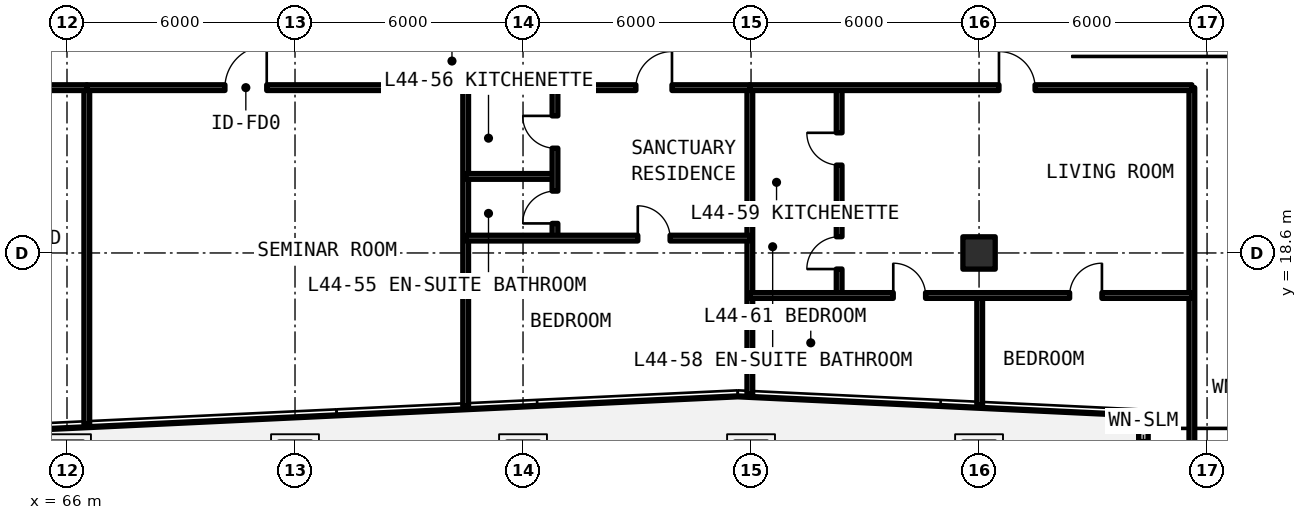
"""IFC4 building model, lengths in metres.
Left out: names, types, materials, properties, quantities, classifications, styles, units other than length and angle.
Written with IfcOpenShell. Run it as: python <this file> out.ifc"""

import sys

from ifc_helpers import new_model, si_unit, direction, frame, frame_2d, origin, origin_2d, place, context, subcontext, project, spatial, rectangle, extrude, element, fill, save


model = new_model("IFC4")
c1 = context("Model", 3, precision=1e-05, world=origin(), true_north=direction((0.0, 1.0)))
c2 = subcontext(c1, "Body", "Model", "MODEL_VIEW")
j1 = project(units=[si_unit("LENGTHUNIT", "METRE"), si_unit("PLANEANGLEUNIT", "RADIAN")], contexts=[c1])
p1 = place(None, origin())
s1 = spatial("IfcSite", under=j1, at=p1, CompositionType="ELEMENT")
p2 = place(p1, origin())
s2 = spatial("IfcBuilding", under=s1, at=p2, CompositionType="ELEMENT")
p3 = place(p2, frame((0.0, 0.0, 158.4)))
s3 = spatial("IfcBuildingStorey", under=s2, at=p3, CompositionType="ELEMENT", Elevation=158.4)
p4 = place(p3, frame((90.0, 18.6, 0.0), z_axis=(0.0, 0.0, 1.0), x_axis=(1.0, 0.0, 0.0)))
e1 = element("IfcColumn", 1, at=p4, inside=s3, PredefinedType="COLUMN", context=c2, shape_type="SweptSolid", body=[
    extrude(rectangle(XDim=0.85, YDim=0.85, at=origin_2d()), origin(), (0.0, 0.0, 1.0), 3.63),
])
p5 = place(p3, frame((94.325, 14.399, 0.0), z_axis=(0.0, 0.0, 1.0), x_axis=(0.0, -1.0, 0.0)))
e2 = element("IfcWall", 2, at=p5, inside=s3, PredefinedType="SOLIDWALL", context=c2, shape_type="SweptSolid", body=[
    extrude(rectangle(XDim=2.374, YDim=0.25, at=frame_2d((1.187, 0.0))), origin(), (0.0, 0.0, 1.0), 3.41),
])
p6 = place(p5, frame((0.762, 0.0, 0.78)))
e3 = element("IfcOpeningElement", 3, at=p6, cuts=e2, PredefinedType="OPENING", context=c2, shape_type="SweptSolid", body=[
    extrude(rectangle(XDim=0.85, YDim=1.65, at=frame_2d((0.425, 0.825))), frame((0.0, 0.135, 0.0), z_axis=(0.0, -1.0, 0.0), x_axis=(1.0, 0.0, 0.0)), (0.0, 0.0, 1.0), 0.27),
])
p7 = place(p3, frame((95.748, 12.025, 0.0), z_axis=(0.0, 0.0, 1.0), x_axis=(0.70708586489, 0.707127696864, 0.0)))
e4 = element("IfcWall", 4, at=p7, inside=s3, PredefinedType="SOLIDWALL", context=c2, shape_type="SweptSolid", body=[
    extrude(rectangle(XDim=5.836, YDim=0.25, at=frame_2d((2.918, 0.0))), origin(), (0.0, 0.0, 1.0), 3.41),
])
p8 = place(p7, frame((1.218, 0.0, 0.78)))
e5 = element("IfcOpeningElement", 5, at=p8, cuts=e4, PredefinedType="OPENING", context=c2, shape_type="SweptSolid", body=[
    extrude(rectangle(XDim=3.4, YDim=1.66, at=frame_2d((1.7, 0.83))), frame((0.0, 0.135, 0.0), z_axis=(0.0, -1.0, 0.0), x_axis=(1.0, 0.0, 0.0)), (0.0, 0.0, 1.0), 0.27),
])
p9 = place(p3, frame((95.6, 12.025, 0.0), z_axis=(0.0, 0.0, 1.0), x_axis=(0.0, 1.0, 0.0)))
e6 = element("IfcWall", 6, at=p9, inside=s3, PredefinedType="SOLIDWALL", context=c2, shape_type="SweptSolid", body=[
    extrude(rectangle(XDim=10.925, YDim=0.15, at=frame_2d((5.462, 0.0))), origin(), (0.0, 0.0, 1.0), 2.63),
])
p10 = place(p3, frame((66.521, 14.093, 0.0), z_axis=(0.0, 0.0, 1.0), x_axis=(0.0, 1.0, 0.0)))
e7 = element("IfcWall", 7, at=p10, inside=s3, PredefinedType="SOLIDWALL", context=c2, shape_type="SweptSolid", body=[
    extrude(rectangle(XDim=8.857, YDim=0.15, at=frame_2d((4.428, 0.0))), origin(), (0.0, 0.0, 1.0), 2.63),
])
p11 = place(p3, frame((58.767, 22.95, 0.0), z_axis=(0.0, 0.0, 1.0), x_axis=(1.0, 0.0, 0.0)))
e8 = element("IfcWall", 8, at=p11, inside=s3, PredefinedType="SOLIDWALL", context=c2, shape_type="SweptSolid", body=[
    extrude(rectangle(XDim=7.754, YDim=0.15, at=frame_2d((3.877, 0.0))), origin(), (0.0, 0.0, 1.0), 2.63),
])
p12 = place(p11, frame((4.617, 0.0, 0.0)))
e9 = element("IfcOpeningElement", 9, at=p12, cuts=e8, PredefinedType="OPENING", context=c2, shape_type="SweptSolid", body=[
    extrude(rectangle(XDim=0.95, YDim=2.15, at=frame_2d((0.475, 1.075))), frame((0.0, 0.085, 0.0), z_axis=(0.0, -1.0, 0.0), x_axis=(1.0, 0.0, 0.0)), (0.0, 0.0, 1.0), 0.17),
])
p13 = place(p3, frame((76.491, 14.566, 0.0), z_axis=(0.0, 0.0, 1.0), x_axis=(0.0, 1.0, 0.0)))
e10 = element("IfcWall", 10, at=p13, inside=s3, PredefinedType="SOLIDWALL", context=c2, shape_type="SweptSolid", body=[
    extrude(rectangle(XDim=8.384, YDim=0.15, at=frame_2d((4.192, 0.0))), origin(), (0.0, 0.0, 1.0), 2.63),
])
p14 = place(p3, frame((66.521, 22.95, 0.0), z_axis=(0.0, 0.0, 1.0), x_axis=(1.0, 0.0, 0.0)))
e11 = element("IfcWall", 11, at=p14, inside=s3, PredefinedType="SOLIDWALL", context=c2, shape_type="SweptSolid", body=[
    extrude(rectangle(XDim=9.97, YDim=0.15, at=frame_2d((4.985, 0.0))), origin(), (0.0, 0.0, 1.0), 2.63),
])
p15 = place(p14, frame((3.635, 0.0, 0.0)))
e12 = element("IfcOpeningElement", 12, at=p15, cuts=e11, PredefinedType="OPENING", context=c2, shape_type="SweptSolid", body=[
    extrude(rectangle(XDim=1.1, YDim=2.15, at=frame_2d((0.55, 1.075))), frame((0.0, 0.085, 0.0), z_axis=(0.0, -1.0, 0.0), x_axis=(1.0, 0.0, 0.0)), (0.0, 0.0, 1.0), 0.17),
])
p16 = place(p3, frame((83.969, 14.89, 0.0), z_axis=(0.0, 0.0, 1.0), x_axis=(0.0, 1.0, 0.0)))
e13 = element("IfcWall", 13, at=p16, inside=s3, PredefinedType="SOLIDWALL", context=c2, shape_type="SweptSolid", body=[
    extrude(rectangle(XDim=8.06, YDim=0.15, at=frame_2d((4.03, 0.0))), origin(), (0.0, 0.0, 1.0), 2.63),
])
p17 = place(p3, frame((76.491, 20.614, 0.0), z_axis=(0.0, 0.0, 1.0), x_axis=(1.0, 0.0, 0.0)))
e14 = element("IfcWall", 14, at=p17, inside=s3, PredefinedType="PARTITIONING", context=c2, shape_type="SweptSolid", body=[
    extrude(rectangle(XDim=2.35, YDim=0.15, at=frame_2d((1.175, 0.0))), origin(), (0.0, 0.0, 1.0), 2.63),
])
p18 = place(p3, frame((78.841, 18.991, 0.0), z_axis=(0.0, 0.0, 1.0), x_axis=(0.0, 1.0, 0.0)))
e15 = element("IfcWall", 15, at=p18, inside=s3, PredefinedType="PARTITIONING", context=c2, shape_type="SweptSolid", body=[
    extrude(rectangle(XDim=3.959, YDim=0.15, at=frame_2d((1.979, 0.0))), origin(), (0.0, 0.0, 1.0), 2.63),
])
p19 = place(p18, frame((0.387, 0.0, 0.0)))
e16 = element("IfcOpeningElement", 16, at=p19, cuts=e15, PredefinedType="OPENING", context=c2, shape_type="SweptSolid", body=[
    extrude(rectangle(XDim=0.85, YDim=2.1, at=frame_2d((0.425, 1.05))), frame((0.0, 0.085, 0.0), z_axis=(0.0, -1.0, 0.0), x_axis=(1.0, 0.0, 0.0)), (0.0, 0.0, 1.0), 0.17),
])
p20 = place(p18, frame((2.366, 0.0, 0.0)))
e17 = element("IfcOpeningElement", 17, at=p20, cuts=e15, PredefinedType="OPENING", context=c2, shape_type="SweptSolid", body=[
    extrude(rectangle(XDim=0.85, YDim=2.1, at=frame_2d((0.425, 1.05))), frame((0.0, 0.085, 0.0), z_axis=(0.0, -1.0, 0.0), x_axis=(1.0, 0.0, 0.0)), (0.0, 0.0, 1.0), 0.17),
])
p21 = place(p3, frame((76.491, 18.991, 0.0), z_axis=(0.0, 0.0, 1.0), x_axis=(1.0, 0.0, 0.0)))
e18 = element("IfcWall", 18, at=p21, inside=s3, PredefinedType="PARTITIONING", context=c2, shape_type="SweptSolid", body=[
    extrude(rectangle(XDim=7.478, YDim=0.15, at=frame_2d((3.739, 0.0))), origin(), (0.0, 0.0, 1.0), 2.63),
])
p22 = place(p21, frame((4.529, 0.0, 0.0)))
e19 = element("IfcOpeningElement", 19, at=p22, cuts=e18, PredefinedType="OPENING", context=c2, shape_type="SweptSolid", body=[
    extrude(rectangle(XDim=0.85, YDim=2.1, at=frame_2d((0.425, 1.05))), frame((0.0, 0.085, 0.0), z_axis=(0.0, -1.0, 0.0), x_axis=(1.0, 0.0, 0.0)), (0.0, 0.0, 1.0), 0.17),
])
p23 = place(p3, frame((76.491, 22.95, 0.0), z_axis=(0.0, 0.0, 1.0), x_axis=(1.0, 0.0, 0.0)))
e20 = element("IfcWall", 20, at=p23, inside=s3, PredefinedType="SOLIDWALL", context=c2, shape_type="SweptSolid", body=[
    extrude(rectangle(XDim=7.478, YDim=0.15, at=frame_2d((3.739, 0.0))), origin(), (0.0, 0.0, 1.0), 2.63),
])
p24 = place(p23, frame((4.479, 0.0, 0.0)))
e21 = element("IfcOpeningElement", 21, at=p24, cuts=e20, PredefinedType="OPENING", context=c2, shape_type="SweptSolid", body=[
    extrude(rectangle(XDim=0.95, YDim=2.15, at=frame_2d((0.475, 1.075))), frame((0.0, 0.085, 0.0), z_axis=(0.0, -1.0, 0.0), x_axis=(1.0, 0.0, 0.0)), (0.0, 0.0, 1.0), 0.17),
])
p25 = place(p3, frame((83.969, 19.723, 0.0), z_axis=(0.0, 0.0, 1.0), x_axis=(1.0, 0.0, 0.0)))
e22 = element("IfcWall", 22, at=p25, inside=s3, PredefinedType="PARTITIONING", context=c2, shape_type="SweptSolid", body=[
    extrude(rectangle(XDim=2.35, YDim=0.15, at=frame_2d((1.175, 0.0))), origin(), (0.0, 0.0, 1.0), 2.63),
])
p26 = place(p3, frame((86.318, 17.481, 0.0), z_axis=(0.0, 0.0, 1.0), x_axis=(0.0, 1.0, 0.0)))
e23 = element("IfcWall", 23, at=p26, inside=s3, PredefinedType="PARTITIONING", context=c2, shape_type="SweptSolid", body=[
    extrude(rectangle(XDim=5.469, YDim=0.15, at=frame_2d((2.734, 0.0))), origin(), (0.0, 0.0, 1.0), 2.63),
])
p27 = place(p26, frame((0.696, 0.0, 0.0)))
e24 = element("IfcOpeningElement", 24, at=p27, cuts=e23, PredefinedType="OPENING", context=c2, shape_type="SweptSolid", body=[
    extrude(rectangle(XDim=0.85, YDim=2.1, at=frame_2d((0.425, 1.05))), frame((0.0, 0.085, 0.0), z_axis=(0.0, -1.0, 0.0), x_axis=(1.0, 0.0, 0.0)), (0.0, 0.0, 1.0), 0.17),
])
p28 = place(p26, frame((3.431, 0.0, 0.0)))
e25 = element("IfcOpeningElement", 25, at=p28, cuts=e23, PredefinedType="OPENING", context=c2, shape_type="SweptSolid", body=[
    extrude(rectangle(XDim=0.85, YDim=2.1, at=frame_2d((0.425, 1.05))), frame((0.0, 0.085, 0.0), z_axis=(0.0, -1.0, 0.0), x_axis=(1.0, 0.0, 0.0)), (0.0, 0.0, 1.0), 0.17),
])
p29 = place(p3, frame((90.017, 14.604, 0.0), z_axis=(0.0, 0.0, 1.0), x_axis=(0.0, 1.0, 0.0)))
e26 = element("IfcWall", 26, at=p29, inside=s3, PredefinedType="PARTITIONING", context=c2, shape_type="SweptSolid", body=[
    extrude(rectangle(XDim=2.877, YDim=0.15, at=frame_2d((1.439, 0.0))), origin(), (0.0, 0.0, 1.0), 2.63),
])
p30 = place(p3, frame((83.969, 17.481, 0.0), z_axis=(0.0, 0.0, 1.0), x_axis=(1.0, 0.0, 0.0)))
e27 = element("IfcWall", 27, at=p30, inside=s3, PredefinedType="PARTITIONING", context=c2, shape_type="SweptSolid", body=[
    extrude(rectangle(XDim=11.632, YDim=0.15, at=frame_2d((5.816, 0.0))), origin(), (0.0, 0.0, 1.0), 2.63),
])
p31 = place(p30, frame((3.774, 0.0, 0.0)))
e28 = element("IfcOpeningElement", 28, at=p31, cuts=e27, PredefinedType="OPENING", context=c2, shape_type="SweptSolid", body=[
    extrude(rectangle(XDim=0.85, YDim=2.1, at=frame_2d((0.425, 1.05))), frame((0.0, 0.085, 0.0), z_axis=(0.0, -1.0, 0.0), x_axis=(1.0, 0.0, 0.0)), (0.0, 0.0, 1.0), 0.17),
])
p32 = place(p30, frame((8.415, 0.0, 0.0)))
e29 = element("IfcOpeningElement", 29, at=p32, cuts=e27, PredefinedType="OPENING", context=c2, shape_type="SweptSolid", body=[
    extrude(rectangle(XDim=0.85, YDim=2.1, at=frame_2d((0.425, 1.05))), frame((0.0, 0.085, 0.0), z_axis=(0.0, -1.0, 0.0), x_axis=(1.0, 0.0, 0.0)), (0.0, 0.0, 1.0), 0.17),
])
p33 = place(p3, frame((83.969, 22.95, 0.0), z_axis=(0.0, 0.0, 1.0), x_axis=(1.0, 0.0, 0.0)))
e30 = element("IfcWall", 30, at=p33, inside=s3, PredefinedType="SOLIDWALL", context=c2, shape_type="SweptSolid", body=[
    extrude(rectangle(XDim=11.632, YDim=0.15, at=frame_2d((5.816, 0.0))), origin(), (0.0, 0.0, 1.0), 2.63),
])
p34 = place(p33, frame((6.556, 0.0, 0.0)))
e31 = element("IfcOpeningElement", 31, at=p34, cuts=e30, PredefinedType="OPENING", context=c2, shape_type="SweptSolid", body=[
    extrude(rectangle(XDim=0.95, YDim=2.15, at=frame_2d((0.475, 1.075))), frame((0.0, 0.085, 0.0), z_axis=(0.0, -1.0, 0.0), x_axis=(1.0, 0.0, 0.0)), (0.0, 0.0, 1.0), 0.17),
])
p35 = place(p15, origin())
e32 = element("IfcDoor", 32, at=p35, inside=s3, OperationType="SINGLE_SWING_RIGHT", PredefinedType="DOOR", context=c2, shape_type="SweptSolid", body=[
    extrude(rectangle(XDim=1.1, YDim=2.15, at=frame_2d((0.55, 1.075))), frame((0.0, 0.025, 0.0), z_axis=(0.0, -1.0, 0.0), x_axis=(1.0, 0.0, 0.0)), (0.0, 0.0, 1.0), 0.05),
])
fill(e12, e32)
p36 = place(p19, origin())
e33 = element("IfcDoor", 33, at=p36, inside=s3, OperationType="SINGLE_SWING_LEFT", PredefinedType="DOOR", context=c2, shape_type="SweptSolid", body=[
    extrude(rectangle(XDim=0.85, YDim=2.1, at=frame_2d((0.425, 1.05))), frame((0.0, 0.025, 0.0), z_axis=(0.0, -1.0, 0.0), x_axis=(1.0, 0.0, 0.0)), (0.0, 0.0, 1.0), 0.05),
])
fill(e16, e33)
p37 = place(p20, origin())
e34 = element("IfcDoor", 34, at=p37, inside=s3, OperationType="SINGLE_SWING_RIGHT", PredefinedType="DOOR", context=c2, shape_type="SweptSolid", body=[
    extrude(rectangle(XDim=0.85, YDim=2.1, at=frame_2d((0.425, 1.05))), frame((0.0, 0.025, 0.0), z_axis=(0.0, -1.0, 0.0), x_axis=(1.0, 0.0, 0.0)), (0.0, 0.0, 1.0), 0.05),
])
fill(e17, e34)
p38 = place(p22, origin())
e35 = element("IfcDoor", 35, at=p38, inside=s3, OperationType="SINGLE_SWING_LEFT", PredefinedType="DOOR", context=c2, shape_type="SweptSolid", body=[
    extrude(rectangle(XDim=0.85, YDim=2.1, at=frame_2d((0.425, 1.05))), frame((0.0, 0.025, 0.0), z_axis=(0.0, -1.0, 0.0), x_axis=(1.0, 0.0, 0.0)), (0.0, 0.0, 1.0), 0.05),
])
fill(e19, e35)
p39 = place(p24, origin())
e36 = element("IfcDoor", 36, at=p39, inside=s3, OperationType="SINGLE_SWING_RIGHT", PredefinedType="DOOR", context=c2, shape_type="SweptSolid", body=[
    extrude(rectangle(XDim=0.95, YDim=2.15, at=frame_2d((0.475, 1.075))), frame((0.0, 0.025, 0.0), z_axis=(0.0, -1.0, 0.0), x_axis=(1.0, 0.0, 0.0)), (0.0, 0.0, 1.0), 0.05),
])
fill(e21, e36)
p40 = place(p27, origin())
e37 = element("IfcDoor", 37, at=p40, inside=s3, OperationType="SINGLE_SWING_LEFT", PredefinedType="DOOR", context=c2, shape_type="SweptSolid", body=[
    extrude(rectangle(XDim=0.85, YDim=2.1, at=frame_2d((0.425, 1.05))), frame((0.0, 0.025, 0.0), z_axis=(0.0, -1.0, 0.0), x_axis=(1.0, 0.0, 0.0)), (0.0, 0.0, 1.0), 0.05),
])
fill(e24, e37)
p41 = place(p28, origin())
e38 = element("IfcDoor", 38, at=p41, inside=s3, OperationType="SINGLE_SWING_RIGHT", PredefinedType="DOOR", context=c2, shape_type="SweptSolid", body=[
    extrude(rectangle(XDim=0.85, YDim=2.1, at=frame_2d((0.425, 1.05))), frame((0.0, 0.025, 0.0), z_axis=(0.0, -1.0, 0.0), x_axis=(1.0, 0.0, 0.0)), (0.0, 0.0, 1.0), 0.05),
])
fill(e25, e38)
p42 = place(p31, origin())
e39 = element("IfcDoor", 39, at=p42, inside=s3, OperationType="SINGLE_SWING_LEFT", PredefinedType="DOOR", context=c2, shape_type="SweptSolid", body=[
    extrude(rectangle(XDim=0.85, YDim=2.1, at=frame_2d((0.425, 1.05))), frame((0.0, 0.025, 0.0), z_axis=(0.0, -1.0, 0.0), x_axis=(1.0, 0.0, 0.0)), (0.0, 0.0, 1.0), 0.05),
])
fill(e28, e39)
p43 = place(p32, origin())
e40 = element("IfcDoor", 40, at=p43, inside=s3, OperationType="SINGLE_SWING_RIGHT", PredefinedType="DOOR", context=c2, shape_type="SweptSolid", body=[
    extrude(rectangle(XDim=0.85, YDim=2.1, at=frame_2d((0.425, 1.05))), frame((0.0, 0.025, 0.0), z_axis=(0.0, -1.0, 0.0), x_axis=(1.0, 0.0, 0.0)), (0.0, 0.0, 1.0), 0.05),
])
fill(e29, e40)
p44 = place(p34, origin())
e41 = element("IfcDoor", 41, at=p44, inside=s3, OperationType="SINGLE_SWING_LEFT", PredefinedType="DOOR", context=c2, shape_type="SweptSolid", body=[
    extrude(rectangle(XDim=0.95, YDim=2.15, at=frame_2d((0.475, 1.075))), frame((0.0, 0.025, 0.0), z_axis=(0.0, -1.0, 0.0), x_axis=(1.0, 0.0, 0.0)), (0.0, 0.0, 1.0), 0.05),
])
fill(e31, e41)
save(model, sys.argv[1])
